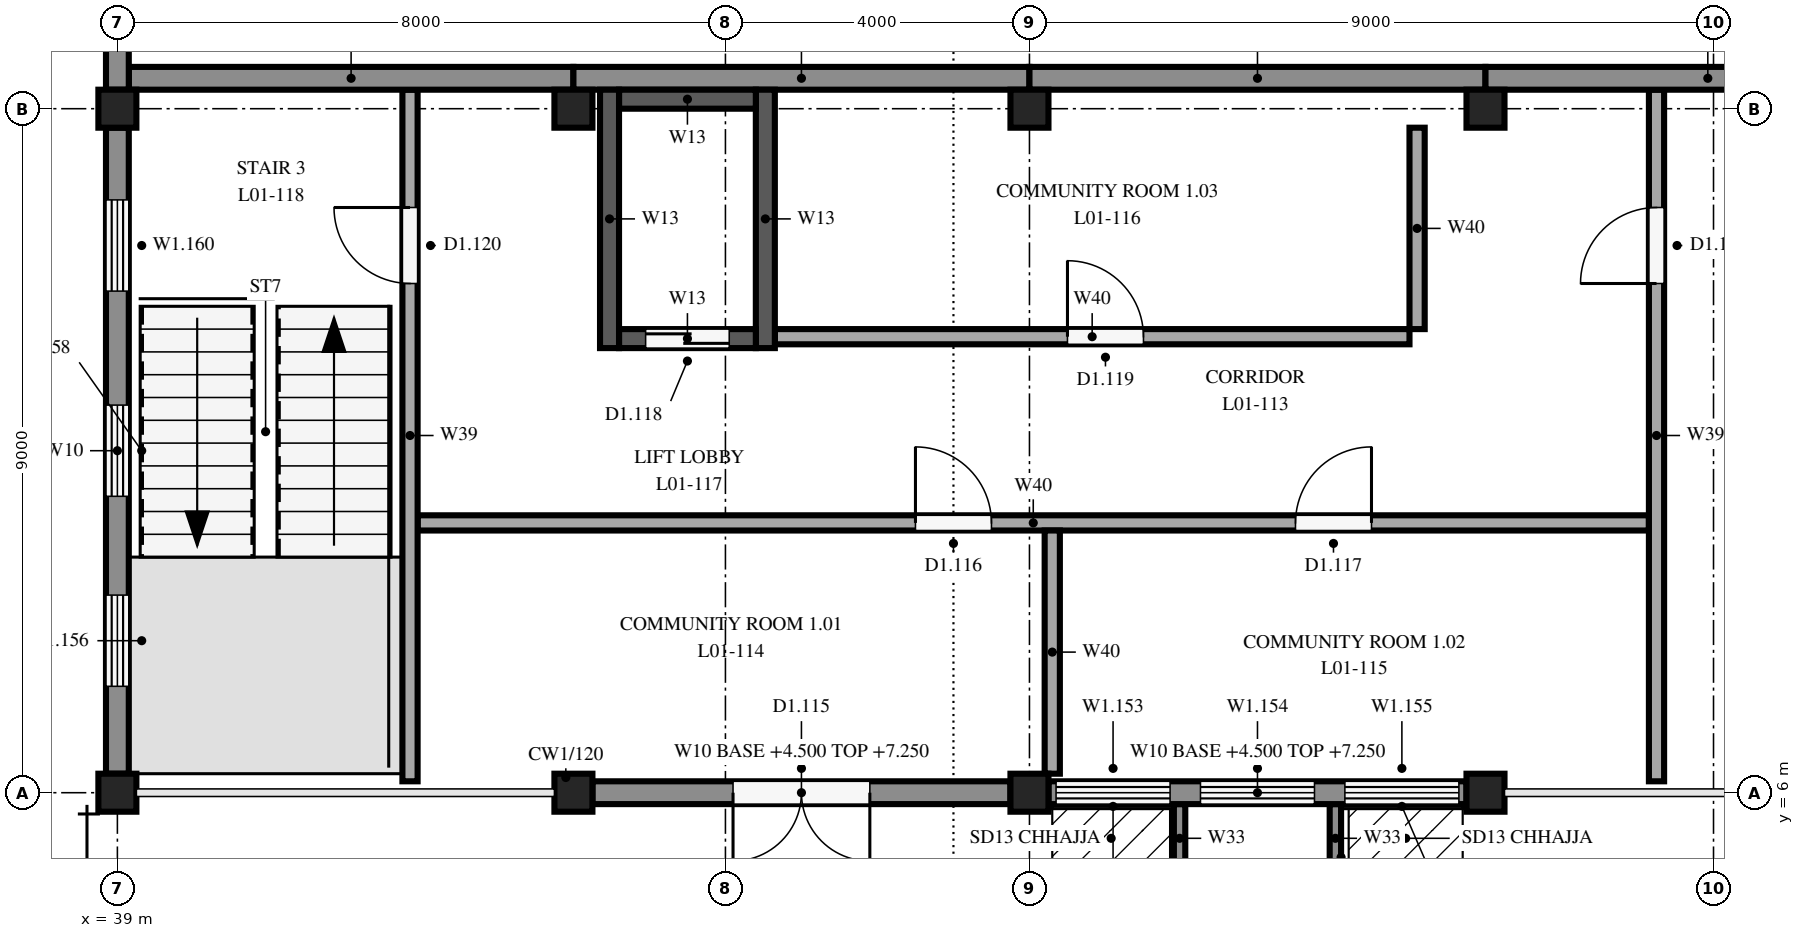
"""IFC4 building model, lengths in metres.
Left out: names, types, materials, properties, quantities, classifications, styles, units other than length and angle.
Written with IfcOpenShell. Run it as: python <this file> out.ifc"""

import sys

from ifc_helpers import new_model, si_unit, direction, frame, frame_2d, origin, origin_2d, place, context, subcontext, project, spatial, rectangle, extrude, element, fill, save


model = new_model("IFC4")
c1 = context("Model", 3, precision=1e-05, world=origin(), true_north=direction((0.0, 1.0)))
c2 = subcontext(c1, "Body", "Model", "MODEL_VIEW")
j1 = project(units=[si_unit("LENGTHUNIT", "METRE"), si_unit("PLANEANGLEUNIT", "RADIAN")], contexts=[c1])
p1 = place(None, origin())
s1 = spatial("IfcSite", under=j1, at=p1, CompositionType="ELEMENT")
p2 = place(p1, origin())
s2 = spatial("IfcBuilding", under=s1, at=p2, CompositionType="ELEMENT")
p3 = place(p2, frame((0.0, 0.0, 4.5)))
s3 = spatial("IfcBuildingStorey", under=s2, at=p3, CompositionType="ELEMENT", Elevation=4.5)
for number, where, z_axis, x_axis in (
    (1, (39.0, 6.0, 0.0), (0.0, 0.0, 1.0), (1.0, 0.0, 0.0)),
    (2, (39.0, 15.0, 0.0), (0.0, 0.0, 1.0), (1.0, 0.0, 0.0)),
    (3, (45.0, 6.0, 0.0), (0.0, 0.0, 1.0), (1.0, 0.0, 0.0)),
    (4, (45.0, 15.0, 0.0), (0.0, 0.0, 1.0), (1.0, 0.0, 0.0)),
    (5, (51.0, 6.0, 0.0), (0.0, 0.0, 1.0), (1.0, 0.0, 0.0)),
    (6, (51.0, 15.0, 0.0), (0.0, 0.0, 1.0), (1.0, 0.0, 0.0)),
    (7, (57.0, 6.0, 0.0), (0.0, 0.0, 1.0), (1.0, 0.0, 0.0)),
    (8, (57.0, 15.0, 0.0), (0.0, 0.0, 1.0), (1.0, 0.0, 0.0)),
):
    element("IfcColumn", number, at=place(p3, frame(where, z_axis=z_axis, x_axis=x_axis)), inside=s3, PredefinedType="COLUMN", context=c2, shape_type="SweptSolid", body=[
        extrude(rectangle(XDim=0.5, YDim=0.5, at=origin_2d()), origin(), (0.0, 0.0, 1.0), 3.3),
    ])
p4 = place(p3, frame((50.75, 6.0, 0.0), z_axis=(0.0, 0.0, 1.0), x_axis=(-1.0, 0.0, 0.0)))
e9 = element("IfcWall", 9, at=p4, inside=s3, PredefinedType="SOLIDWALL", context=c2, shape_type="SweptSolid", body=[
    extrude(rectangle(XDim=5.5, YDim=0.3, at=frame_2d((2.75, 0.0))), origin(), (0.0, 0.0, 1.0), 2.75),
])
p5 = place(p4, frame((1.85, 0.0, 0.0)))
e10 = element("IfcOpeningElement", 10, at=p5, cuts=e9, PredefinedType="OPENING", context=c2, shape_type="SweptSolid", body=[
    extrude(rectangle(XDim=1.8, YDim=2.4, at=frame_2d((0.9, 1.2))), frame((0.0, 0.16, 0.0), z_axis=(0.0, -1.0, 0.0), x_axis=(1.0, 0.0, 0.0)), (0.0, 0.0, 1.0), 0.32),
])
p6 = place(p3, frame((56.75, 6.0, 0.0), z_axis=(0.0, 0.0, 1.0), x_axis=(-1.0, 0.0, 0.0)))
e11 = element("IfcWall", 11, at=p6, inside=s3, PredefinedType="SOLIDWALL", context=c2, shape_type="SweptSolid", body=[
    extrude(rectangle(XDim=5.5, YDim=0.3, at=frame_2d((2.75, 0.0))), origin(), (0.0, 0.0, 1.0), 2.75),
])
p7 = place(p6, frame((3.9, 0.0, 0.6)))
e12 = element("IfcOpeningElement", 12, at=p7, cuts=e11, PredefinedType="OPENING", context=c2, shape_type="SweptSolid", body=[
    extrude(rectangle(XDim=1.5, YDim=1.9, at=frame_2d((0.75, 0.95))), frame((0.0, 0.16, 0.0), z_axis=(0.0, -1.0, 0.0), x_axis=(1.0, 0.0, 0.0)), (0.0, 0.0, 1.0), 0.32),
])
p8 = place(p6, frame((2.0, 0.0, 0.6)))
e13 = element("IfcOpeningElement", 13, at=p8, cuts=e11, PredefinedType="OPENING", context=c2, shape_type="SweptSolid", body=[
    extrude(rectangle(XDim=1.5, YDim=1.9, at=frame_2d((0.75, 0.95))), frame((0.0, 0.16, 0.0), z_axis=(0.0, -1.0, 0.0), x_axis=(1.0, 0.0, 0.0)), (0.0, 0.0, 1.0), 0.32),
])
p9 = place(p6, frame((0.1, 0.0, 0.6)))
e14 = element("IfcOpeningElement", 14, at=p9, cuts=e11, PredefinedType="OPENING", context=c2, shape_type="SweptSolid", body=[
    extrude(rectangle(XDim=1.5, YDim=1.9, at=frame_2d((0.75, 0.95))), frame((0.0, 0.16, 0.0), z_axis=(0.0, -1.0, 0.0), x_axis=(1.0, 0.0, 0.0)), (0.0, 0.0, 1.0), 0.32),
])
p10 = place(p3, frame((39.0, 6.25, 0.0), z_axis=(0.0, 0.0, 1.0), x_axis=(0.0, 1.0, 0.0)))
e15 = element("IfcWall", 15, at=p10, inside=s3, PredefinedType="SOLIDWALL", context=c2, shape_type="SweptSolid", body=[
    extrude(rectangle(XDim=8.5, YDim=0.3, at=frame_2d((4.25, 0.0))), origin(), (0.0, 0.0, 1.0), 2.7),
])
p11 = place(p10, frame((1.15, 0.0, 0.9)))
e16 = element("IfcOpeningElement", 16, at=p11, cuts=e15, PredefinedType="OPENING", context=c2, shape_type="SweptSolid", body=[
    extrude(rectangle(XDim=1.2, YDim=1.5, at=frame_2d((0.6, 0.75))), frame((0.0, 0.16, 0.0), z_axis=(0.0, -1.0, 0.0), x_axis=(1.0, 0.0, 0.0)), (0.0, 0.0, 1.0), 0.32),
])
p12 = place(p10, frame((3.65, 0.0, 0.9)))
e17 = element("IfcOpeningElement", 17, at=p12, cuts=e15, PredefinedType="OPENING", context=c2, shape_type="SweptSolid", body=[
    extrude(rectangle(XDim=1.2, YDim=1.5, at=frame_2d((0.6, 0.75))), frame((0.0, 0.16, 0.0), z_axis=(0.0, -1.0, 0.0), x_axis=(1.0, 0.0, 0.0)), (0.0, 0.0, 1.0), 0.32),
])
p13 = place(p10, frame((6.35, 0.0, 0.9)))
e18 = element("IfcOpeningElement", 18, at=p13, cuts=e15, PredefinedType="OPENING", context=c2, shape_type="SweptSolid", body=[
    extrude(rectangle(XDim=1.2, YDim=1.5, at=frame_2d((0.6, 0.75))), frame((0.0, 0.16, 0.0), z_axis=(0.0, -1.0, 0.0), x_axis=(1.0, 0.0, 0.0)), (0.0, 0.0, 1.0), 0.32),
])
p14 = place(p3, frame((45.0, 15.4, 0.0), z_axis=(0.0, 0.0, 1.0), x_axis=(-1.0, 0.0, 0.0)))
e19 = element("IfcWall", 19, at=p14, inside=s3, PredefinedType="SOLIDWALL", context=c2, shape_type="SweptSolid", body=[
    extrude(rectangle(XDim=5.85, YDim=0.3, at=frame_2d((2.925, 0.0))), origin(), (0.0, 0.0, 1.0), 3.6),
])
for number, where, z_axis, x_axis in (
    (20, (51.0, 15.4, 0.0), (0.0, 0.0, 1.0), (-1.0, 0.0, 0.0)),
    (21, (57.0, 15.4, 0.0), (0.0, 0.0, 1.0), (-1.0, 0.0, 0.0)),
):
    element("IfcWall", number, at=place(p3, frame(where, z_axis=z_axis, x_axis=x_axis)), inside=s3, PredefinedType="SOLIDWALL", context=c2, shape_type="SweptSolid", body=[
        extrude(rectangle(XDim=6.0, YDim=0.3, at=frame_2d((3.0, 0.0))), origin(), (0.0, 0.0, 1.0), 3.6),
    ])
p15 = place(p3, frame((62.85, 15.4, 0.0), z_axis=(0.0, 0.0, 1.0), x_axis=(-1.0, 0.0, 0.0)))
e22 = element("IfcWall", 22, at=p15, inside=s3, PredefinedType="SOLIDWALL", context=c2, shape_type="SweptSolid", body=[
    extrude(rectangle(XDim=5.85, YDim=0.3, at=frame_2d((2.925, 0.0))), origin(), (0.0, 0.0, 1.0), 3.6),
])
for number, where, z_axis, x_axis in (
    (23, (45.475, 11.85, 0.0), (0.0, 0.0, 1.0), (0.0, 1.0, 0.0)),
    (24, (47.525, 11.85, 0.0), (0.0, 0.0, 1.0), (0.0, 1.0, 0.0)),
):
    element("IfcWall", number, at=place(p3, frame(where, z_axis=z_axis, x_axis=x_axis)), inside=s3, PredefinedType="SHEAR", context=c2, shape_type="SweptSolid", body=[
        extrude(rectangle(XDim=3.4, YDim=0.25, at=frame_2d((1.7, 0.0))), origin(), (0.0, 0.0, 1.0), 3.6),
    ])
p16 = place(p3, frame((45.6, 11.975, 0.0), z_axis=(0.0, 0.0, 1.0), x_axis=(1.0, 0.0, 0.0)))
e25 = element("IfcWall", 25, at=p16, inside=s3, PredefinedType="SHEAR", context=c2, shape_type="SweptSolid", body=[
    extrude(rectangle(XDim=1.8, YDim=0.25, at=frame_2d((0.9, 0.0))), origin(), (0.0, 0.0, 1.0), 3.6),
])
p17 = place(p16, frame((0.35, 0.0, 0.0)))
e26 = element("IfcOpeningElement", 26, at=p17, cuts=e25, PredefinedType="OPENING", context=c2, shape_type="SweptSolid", body=[
    extrude(rectangle(XDim=1.1, YDim=2.1, at=frame_2d((0.55, 1.05))), frame((0.0, 0.135, 0.0), z_axis=(0.0, -1.0, 0.0), x_axis=(1.0, 0.0, 0.0)), (0.0, 0.0, 1.0), 0.27),
])
p18 = place(p3, frame((45.6, 15.125, 0.0), z_axis=(0.0, 0.0, 1.0), x_axis=(1.0, 0.0, 0.0)))
e27 = element("IfcWall", 27, at=p18, inside=s3, PredefinedType="SHEAR", context=c2, shape_type="SweptSolid", body=[
    extrude(rectangle(XDim=1.8, YDim=0.25, at=frame_2d((0.9, 0.0))), origin(), (0.0, 0.0, 1.0), 3.6),
])
p19 = place(p3, frame((39.0, 15.25, 0.0), z_axis=(0.0, 0.0, 1.0), x_axis=(0.0, 1.0, 0.0)))
e28 = element("IfcWall", 28, at=p19, inside=s3, PredefinedType="SOLIDWALL", context=c2, shape_type="SweptSolid", body=[
    extrude(rectangle(XDim=5.5, YDim=0.3, at=frame_2d((2.75, 0.0))), origin(), (0.0, 0.0, 1.0), 2.993),
])
p20 = place(p19, frame((1.0, 0.0, 0.5)))
e29 = element("IfcOpeningElement", 29, at=p20, cuts=e28, PredefinedType="OPENING", context=c2, shape_type="SweptSolid", body=[
    extrude(rectangle(XDim=1.5, YDim=2.0, at=frame_2d((0.75, 1.0))), frame((0.0, 0.16, 0.0), z_axis=(0.0, -1.0, 0.0), x_axis=(1.0, 0.0, 0.0)), (0.0, 0.0, 1.0), 0.32),
])
p21 = place(p19, frame((3.0, 0.0, 0.5)))
e30 = element("IfcOpeningElement", 30, at=p21, cuts=e28, PredefinedType="OPENING", context=c2, shape_type="SweptSolid", body=[
    extrude(rectangle(XDim=1.5, YDim=2.0, at=frame_2d((0.75, 1.0))), frame((0.0, 0.16, 0.0), z_axis=(0.0, -1.0, 0.0), x_axis=(1.0, 0.0, 0.0)), (0.0, 0.0, 1.0), 0.32),
])
for number, where, z_axis, x_axis in (
    (31, (52.975, 4.95, 0.65), (0.0, 0.0, 1.0), (0.0, 1.0, 0.0)),
    (32, (55.025, 4.95, 0.65), (0.0, 0.0, 1.0), (0.0, 1.0, 0.0)),
):
    element("IfcWall", number, at=place(p3, frame(where, z_axis=z_axis, x_axis=x_axis)), inside=s3, PredefinedType="SOLIDWALL", context=c2, shape_type="SweptSolid", body=[
        extrude(rectangle(XDim=0.9, YDim=0.15, at=frame_2d((0.45, 0.0))), origin(), (0.0, 0.0, 1.0), 1.95),
    ])
p22 = place(p3, frame((42.85, 6.15, 0.0), z_axis=(0.0, 0.0, 1.0), x_axis=(0.0, 1.0, 0.0)))
e33 = element("IfcWall", 33, at=p22, inside=s3, PredefinedType="SOLIDWALL", context=c2, shape_type="SweptSolid", body=[
    extrude(rectangle(XDim=9.1, YDim=0.2, at=frame_2d((4.55, 0.0))), origin(), (0.0, 0.0, 1.0), 3.3),
])
p23 = place(p22, frame((6.55, 0.0, 0.0)))
e34 = element("IfcOpeningElement", 34, at=p23, cuts=e33, PredefinedType="OPENING", context=c2, shape_type="SweptSolid", body=[
    extrude(rectangle(XDim=1.0, YDim=2.1, at=frame_2d((0.5, 1.05))), frame((0.0, 0.11, 0.0), z_axis=(0.0, -1.0, 0.0), x_axis=(1.0, 0.0, 0.0)), (0.0, 0.0, 1.0), 0.22),
])
p24 = place(p3, frame((59.25, 6.15, 0.0), z_axis=(0.0, 0.0, 1.0), x_axis=(0.0, 1.0, 0.0)))
e35 = element("IfcWall", 35, at=p24, inside=s3, PredefinedType="SOLIDWALL", context=c2, shape_type="SweptSolid", body=[
    extrude(rectangle(XDim=9.1, YDim=0.2, at=frame_2d((4.55, 0.0))), origin(), (0.0, 0.0, 1.0), 3.3),
])
p25 = place(p24, frame((6.55, 0.0, 0.0)))
e36 = element("IfcOpeningElement", 36, at=p25, cuts=e35, PredefinedType="OPENING", context=c2, shape_type="SweptSolid", body=[
    extrude(rectangle(XDim=1.0, YDim=2.1, at=frame_2d((0.5, 1.05))), frame((0.0, 0.11, 0.0), z_axis=(0.0, -1.0, 0.0), x_axis=(1.0, 0.0, 0.0)), (0.0, 0.0, 1.0), 0.22),
])
p26 = place(p3, frame((42.95, 9.55, 0.0), z_axis=(0.0, 0.0, 1.0), x_axis=(1.0, 0.0, 0.0)))
e37 = element("IfcWall", 37, at=p26, inside=s3, PredefinedType="PARTITIONING", context=c2, shape_type="SweptSolid", body=[
    extrude(rectangle(XDim=16.2, YDim=0.2, at=frame_2d((8.1, 0.0))), origin(), (0.0, 0.0, 1.0), 2.7),
])
p27 = place(p26, frame((6.55, 0.0, 0.0)))
e38 = element("IfcOpeningElement", 38, at=p27, cuts=e37, PredefinedType="OPENING", context=c2, shape_type="SweptSolid", body=[
    extrude(rectangle(XDim=1.0, YDim=2.1, at=frame_2d((0.5, 1.05))), frame((0.0, 0.11, 0.0), z_axis=(0.0, -1.0, 0.0), x_axis=(1.0, 0.0, 0.0)), (0.0, 0.0, 1.0), 0.22),
])
p28 = place(p26, frame((11.55, 0.0, 0.0)))
e39 = element("IfcOpeningElement", 39, at=p28, cuts=e37, PredefinedType="OPENING", context=c2, shape_type="SweptSolid", body=[
    extrude(rectangle(XDim=1.0, YDim=2.1, at=frame_2d((0.5, 1.05))), frame((0.0, 0.11, 0.0), z_axis=(0.0, -1.0, 0.0), x_axis=(1.0, 0.0, 0.0)), (0.0, 0.0, 1.0), 0.22),
])
p29 = place(p3, frame((51.3, 6.25, 0.0), z_axis=(0.0, 0.0, 1.0), x_axis=(0.0, 1.0, 0.0)))
e40 = element("IfcWall", 40, at=p29, inside=s3, PredefinedType="PARTITIONING", context=c2, shape_type="SweptSolid", body=[
    extrude(rectangle(XDim=3.2, YDim=0.2, at=frame_2d((1.6, 0.0))), origin(), (0.0, 0.0, 1.0), 2.7),
])
p30 = place(p3, frame((47.65, 12.0, 0.0), z_axis=(0.0, 0.0, 1.0), x_axis=(1.0, 0.0, 0.0)))
e41 = element("IfcWall", 41, at=p30, inside=s3, PredefinedType="PARTITIONING", context=c2, shape_type="SweptSolid", body=[
    extrude(rectangle(XDim=8.35, YDim=0.2, at=frame_2d((4.175, 0.0))), origin(), (0.0, 0.0, 1.0), 2.7),
])
p31 = place(p30, frame((3.85, 0.0, 0.0)))
e42 = element("IfcOpeningElement", 42, at=p31, cuts=e41, PredefinedType="OPENING", context=c2, shape_type="SweptSolid", body=[
    extrude(rectangle(XDim=1.0, YDim=2.1, at=frame_2d((0.5, 1.05))), frame((0.0, 0.11, 0.0), z_axis=(0.0, -1.0, 0.0), x_axis=(1.0, 0.0, 0.0)), (0.0, 0.0, 1.0), 0.22),
])
p32 = place(p3, frame((56.1, 12.1, 0.0), z_axis=(0.0, 0.0, 1.0), x_axis=(0.0, 1.0, 0.0)))
e43 = element("IfcWall", 43, at=p32, inside=s3, PredefinedType="PARTITIONING", context=c2, shape_type="SweptSolid", body=[
    extrude(rectangle(XDim=2.65, YDim=0.2, at=frame_2d((1.325, 0.0))), origin(), (0.0, 0.0, 1.0), 2.7),
])
p33 = place(p5, origin())
e44 = element("IfcDoor", 44, at=p33, inside=s3, OperationType="DOUBLE_DOOR_SINGLE_SWING", PredefinedType="NOTDEFINED", context=c2, shape_type="SweptSolid", body=[
    extrude(rectangle(XDim=1.8, YDim=2.4, at=frame_2d((0.9, 1.2))), frame((0.0, 0.025, 0.0), z_axis=(0.0, -1.0, 0.0), x_axis=(1.0, 0.0, 0.0)), (0.0, 0.0, 1.0), 0.05),
])
fill(e10, e44)
p34 = place(p7, origin())
e45 = element("IfcWindow", 45, at=p34, inside=s3, PartitioningType="SINGLE_PANEL", PredefinedType="WINDOW", context=c2, shape_type="SweptSolid", body=[
    extrude(rectangle(XDim=1.5, YDim=1.9, at=frame_2d((0.75, 0.95))), frame((0.0, 0.03, 0.0), z_axis=(0.0, -1.0, 0.0), x_axis=(1.0, 0.0, 0.0)), (0.0, 0.0, 1.0), 0.06),
])
fill(e12, e45)
p35 = place(p8, origin())
e46 = element("IfcWindow", 46, at=p35, inside=s3, PartitioningType="SINGLE_PANEL", PredefinedType="WINDOW", context=c2, shape_type="SweptSolid", body=[
    extrude(rectangle(XDim=1.5, YDim=1.9, at=frame_2d((0.75, 0.95))), frame((0.0, 0.03, 0.0), z_axis=(0.0, -1.0, 0.0), x_axis=(1.0, 0.0, 0.0)), (0.0, 0.0, 1.0), 0.06),
])
fill(e13, e46)
p36 = place(p9, origin())
e47 = element("IfcWindow", 47, at=p36, inside=s3, PartitioningType="SINGLE_PANEL", PredefinedType="WINDOW", context=c2, shape_type="SweptSolid", body=[
    extrude(rectangle(XDim=1.5, YDim=1.9, at=frame_2d((0.75, 0.95))), frame((0.0, 0.03, 0.0), z_axis=(0.0, -1.0, 0.0), x_axis=(1.0, 0.0, 0.0)), (0.0, 0.0, 1.0), 0.06),
])
fill(e14, e47)
p37 = place(p11, origin())
e48 = element("IfcWindow", 48, at=p37, inside=s3, PartitioningType="SINGLE_PANEL", PredefinedType="WINDOW", context=c2, shape_type="SweptSolid", body=[
    extrude(rectangle(XDim=1.2, YDim=1.5, at=frame_2d((0.6, 0.75))), frame((0.0, 0.03, 0.0), z_axis=(0.0, -1.0, 0.0), x_axis=(1.0, 0.0, 0.0)), (0.0, 0.0, 1.0), 0.06),
])
fill(e16, e48)
p38 = place(p12, origin())
e49 = element("IfcWindow", 49, at=p38, inside=s3, PartitioningType="SINGLE_PANEL", PredefinedType="WINDOW", context=c2, shape_type="SweptSolid", body=[
    extrude(rectangle(XDim=1.2, YDim=1.5, at=frame_2d((0.6, 0.75))), frame((0.0, 0.03, 0.0), z_axis=(0.0, -1.0, 0.0), x_axis=(1.0, 0.0, 0.0)), (0.0, 0.0, 1.0), 0.06),
])
fill(e17, e49)
p39 = place(p13, origin())
e50 = element("IfcWindow", 50, at=p39, inside=s3, PartitioningType="SINGLE_PANEL", PredefinedType="WINDOW", context=c2, shape_type="SweptSolid", body=[
    extrude(rectangle(XDim=1.2, YDim=1.5, at=frame_2d((0.6, 0.75))), frame((0.0, 0.03, 0.0), z_axis=(0.0, -1.0, 0.0), x_axis=(1.0, 0.0, 0.0)), (0.0, 0.0, 1.0), 0.06),
])
fill(e18, e50)
p40 = place(p27, origin())
e51 = element("IfcDoor", 51, at=p40, inside=s3, OperationType="SINGLE_SWING_LEFT", PredefinedType="NOTDEFINED", context=c2, shape_type="SweptSolid", body=[
    extrude(rectangle(XDim=1.0, YDim=2.1, at=frame_2d((0.5, 1.05))), frame((0.0, 0.025, 0.0), z_axis=(0.0, -1.0, 0.0), x_axis=(1.0, 0.0, 0.0)), (0.0, 0.0, 1.0), 0.05),
])
fill(e38, e51)
p41 = place(p28, origin())
e52 = element("IfcDoor", 52, at=p41, inside=s3, OperationType="SINGLE_SWING_RIGHT", PredefinedType="NOTDEFINED", context=c2, shape_type="SweptSolid", body=[
    extrude(rectangle(XDim=1.0, YDim=2.1, at=frame_2d((0.5, 1.05))), frame((0.0, 0.025, 0.0), z_axis=(0.0, -1.0, 0.0), x_axis=(1.0, 0.0, 0.0)), (0.0, 0.0, 1.0), 0.05),
])
fill(e39, e52)
p42 = place(p31, origin())
e53 = element("IfcDoor", 53, at=p42, inside=s3, OperationType="SINGLE_SWING_LEFT", PredefinedType="NOTDEFINED", context=c2, shape_type="SweptSolid", body=[
    extrude(rectangle(XDim=1.0, YDim=2.1, at=frame_2d((0.5, 1.05))), frame((0.0, 0.025, 0.0), z_axis=(0.0, -1.0, 0.0), x_axis=(1.0, 0.0, 0.0)), (0.0, 0.0, 1.0), 0.05),
])
fill(e42, e53)
p43 = place(p23, origin())
e54 = element("IfcDoor", 54, at=p43, inside=s3, OperationType="SINGLE_SWING_RIGHT", PredefinedType="NOTDEFINED", context=c2, shape_type="SweptSolid", body=[
    extrude(rectangle(XDim=1.0, YDim=2.1, at=frame_2d((0.5, 1.05))), frame((0.0, 0.025, 0.0), z_axis=(0.0, -1.0, 0.0), x_axis=(1.0, 0.0, 0.0)), (0.0, 0.0, 1.0), 0.05),
])
fill(e34, e54)
p44 = place(p25, origin())
e55 = element("IfcDoor", 55, at=p44, inside=s3, OperationType="SINGLE_SWING_LEFT", PredefinedType="NOTDEFINED", context=c2, shape_type="SweptSolid", body=[
    extrude(rectangle(XDim=1.0, YDim=2.1, at=frame_2d((0.5, 1.05))), frame((0.0, 0.025, 0.0), z_axis=(0.0, -1.0, 0.0), x_axis=(1.0, 0.0, 0.0)), (0.0, 0.0, 1.0), 0.05),
])
fill(e36, e55)
p45 = place(p17, origin())
e56 = element("IfcDoor", 56, at=p45, inside=s3, OperationType="SLIDING_TO_LEFT", PredefinedType="NOTDEFINED", context=c2, shape_type="SweptSolid", body=[
    extrude(rectangle(XDim=1.1, YDim=2.1, at=frame_2d((0.55, 1.05))), frame((0.0, 0.025, 0.0), z_axis=(0.0, -1.0, 0.0), x_axis=(1.0, 0.0, 0.0)), (0.0, 0.0, 1.0), 0.05),
])
fill(e26, e56)
save(model, sys.argv[1])
